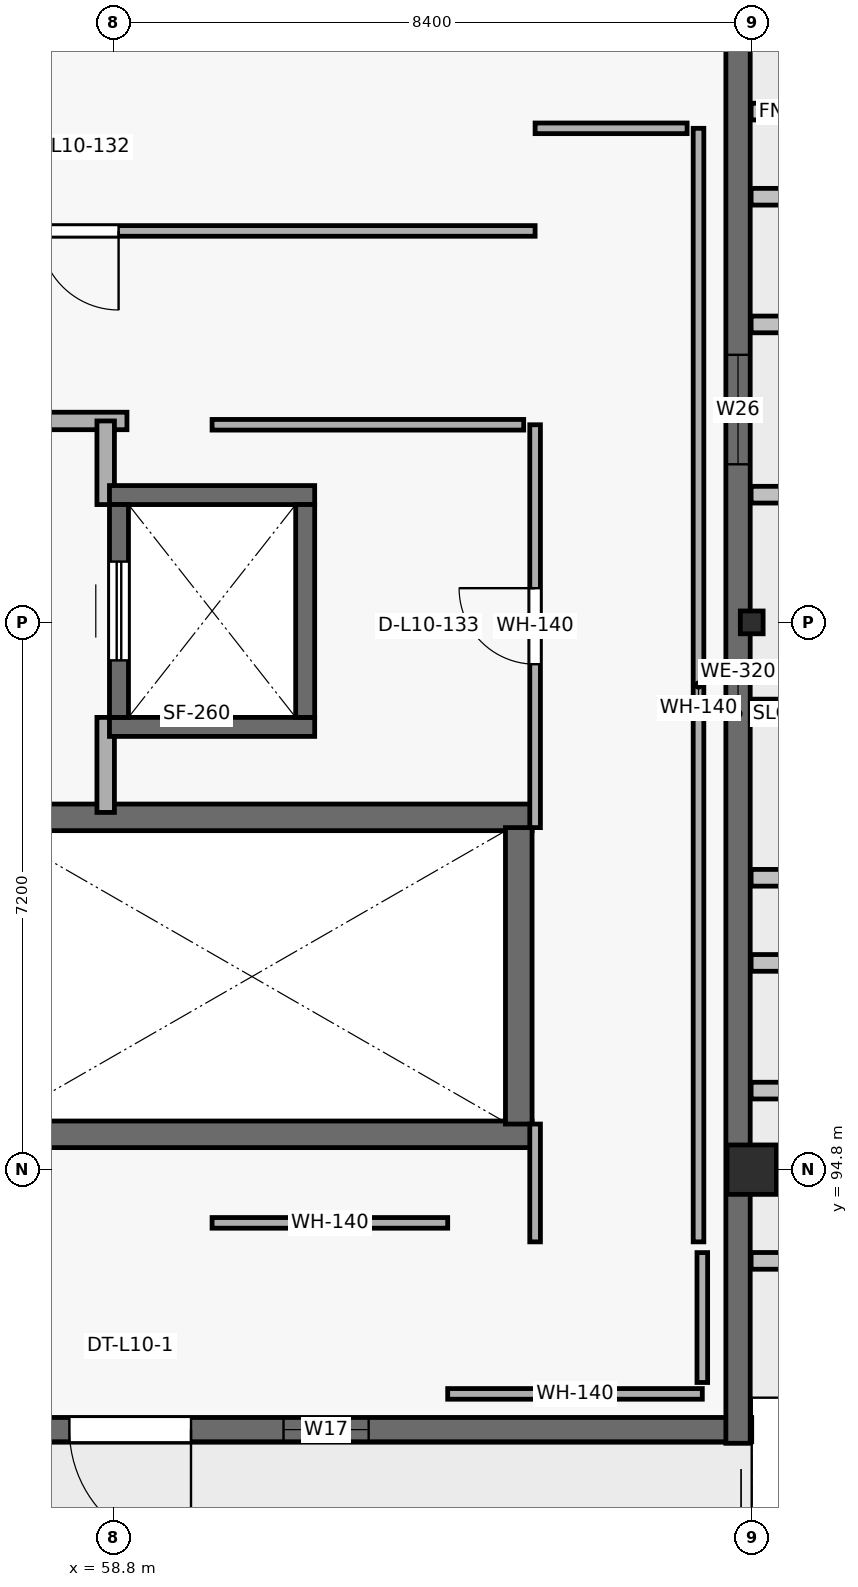
"""IFC4 building model, lengths in metres.
Left out: names, types, materials, properties, quantities, classifications, styles, units other than length and angle.
Written with IfcOpenShell. Run it as: python <this file> out.ifc"""

import sys

from ifc_helpers import new_model, si_unit, direction, frame, frame_2d, origin, origin_2d, place, context, subcontext, project, spatial, rectangle, hollow_rectangle, extrude, element, fill, save


model = new_model("IFC4")
c1 = context("Model", 3, precision=1e-05, world=origin(), true_north=direction((0.0, 1.0)))
c2 = subcontext(c1, "Body", "Model", "MODEL_VIEW")
j1 = project(units=[si_unit("LENGTHUNIT", "METRE"), si_unit("PLANEANGLEUNIT", "RADIAN")], contexts=[c1])
p1 = place(None, origin())
s1 = spatial("IfcSite", under=j1, at=p1, CompositionType="ELEMENT")
p2 = place(p1, origin())
s2 = spatial("IfcBuilding", under=s1, at=p2, CompositionType="ELEMENT")
p3 = place(p2, frame((0.0, 0.0, 44.7)))
s3 = spatial("IfcBuildingStorey", under=s2, at=p3, CompositionType="ELEMENT", Elevation=44.7)
p4 = place(p3, frame((67.2, 94.8, 0.0), z_axis=(0.0, 0.0, 1.0), x_axis=(1.0, 0.0, 0.0)))
e1 = element("IfcColumn", 1, at=p4, inside=s3, PredefinedType="COLUMN", context=c2, shape_type="SweptSolid", body=[
    extrude(rectangle(XDim=0.65, YDim=0.65, at=origin_2d()), origin(), (0.0, 0.0, 1.0), 4.8),
])
p5 = place(p3, frame((67.2, 102.0, 0.0), z_axis=(0.0, 0.0, 1.0), x_axis=(1.0, 0.0, 0.0)))
e2 = element("IfcColumn", 2, at=p5, inside=s3, PredefinedType="COLUMN", context=c2, shape_type="SweptSolid", body=[
    extrude(hollow_rectangle(XDim=0.3, YDim=0.3, WallThickness=0.012, at=origin_2d()), origin(), (0.0, 0.0, 1.0), 4.8),
])
p6 = place(p3, frame((67.2, 91.38, 0.0), z_axis=(0.0, 0.0, 1.0), x_axis=(-1.0, 0.0, 0.0)))
e3 = element("IfcWall", 3, at=p6, inside=s3, PredefinedType="SOLIDWALL", context=c2, shape_type="SweptSolid", body=[
    extrude(rectangle(XDim=33.6, YDim=0.32, at=frame_2d((16.8, 0.0))), origin(), (0.0, 0.0, 1.0), 4.58),
])
p7 = place(p6, frame((7.377, 0.0, 0.0)))
e4 = element("IfcOpeningElement", 4, at=p7, cuts=e3, PredefinedType="OPENING", context=c2, shape_type="SweptSolid", body=[
    extrude(rectangle(XDim=1.6, YDim=2.35, at=frame_2d((0.8, 1.175))), frame((0.0, 0.17, 0.0), z_axis=(0.0, -1.0, 0.0), x_axis=(1.0, 0.0, 0.0)), (0.0, 0.0, 1.0), 0.34),
])
p8 = place(p6, frame((5.04, 0.0, 0.75)))
e5 = element("IfcOpeningElement", 5, at=p8, cuts=e3, PredefinedType="OPENING", context=c2, shape_type="SweptSolid", body=[
    extrude(rectangle(XDim=1.12, YDim=2.25, at=frame_2d((0.56, 1.125))), frame((0.0, 0.17, 0.0), z_axis=(0.0, -1.0, 0.0), x_axis=(1.0, 0.0, 0.0)), (0.0, 0.0, 1.0), 0.34),
])
p9 = place(p6, frame((15.12, 0.0, 0.75)))
e6 = element("IfcOpeningElement", 6, at=p9, cuts=e3, PredefinedType="OPENING", context=c2, shape_type="SweptSolid", body=[
    extrude(rectangle(XDim=1.12, YDim=2.65, at=frame_2d((0.56, 1.325))), frame((0.0, 0.17, 0.0), z_axis=(0.0, -1.0, 0.0), x_axis=(1.0, 0.0, 0.0)), (0.0, 0.0, 1.0), 0.34),
])
p10 = place(p6, frame((25.12, 0.0, 0.75)))
e7 = element("IfcOpeningElement", 7, at=p10, cuts=e3, PredefinedType="OPENING", context=c2, shape_type="SweptSolid", body=[
    extrude(rectangle(XDim=1.28, YDim=1.85, at=frame_2d((0.64, 0.925))), frame((0.0, 0.17, 0.0), z_axis=(0.0, -1.0, 0.0), x_axis=(1.0, 0.0, 0.0)), (0.0, 0.0, 1.0), 0.34),
])
p11 = place(p3, frame((67.02, 110.4, 0.0), z_axis=(0.0, 0.0, 1.0), x_axis=(0.0, -1.0, 0.0)))
e8 = element("IfcWall", 8, at=p11, inside=s3, PredefinedType="SOLIDWALL", context=c2, shape_type="SweptSolid", body=[
    extrude(rectangle(XDim=19.2, YDim=0.32, at=frame_2d((9.6, 0.0))), origin(), (0.0, 0.0, 1.0), 4.58),
])
p12 = place(p11, frame((4.88, 0.0, 0.75)))
e9 = element("IfcOpeningElement", 9, at=p12, cuts=e8, PredefinedType="OPENING", context=c2, shape_type="SweptSolid", body=[
    extrude(rectangle(XDim=1.44, YDim=1.85, at=frame_2d((0.72, 0.925))), frame((0.0, 0.17, 0.0), z_axis=(0.0, -1.0, 0.0), x_axis=(1.0, 0.0, 0.0)), (0.0, 0.0, 1.0), 0.34),
])
p13 = place(p3, frame((55.09, 95.265, 0.0), z_axis=(0.0, 0.0, 1.0), x_axis=(1.0, 0.0, 0.0)))
e10 = element("IfcWall", 10, at=p13, inside=s3, PredefinedType="SHEAR", context=c2, shape_type="SweptSolid", body=[
    extrude(rectangle(XDim=9.22, YDim=0.35, at=frame_2d((4.61, 0.0))), origin(), (0.0, 0.0, 1.0), 4.58),
])
p14 = place(p13, frame((0.45, 0.0, 0.0)))
e11 = element("IfcOpeningElement", 11, at=p14, cuts=e10, PredefinedType="OPENING", context=c2, shape_type="SweptSolid", body=[
    extrude(rectangle(XDim=1.25, YDim=2.2, at=frame_2d((0.625, 1.1))), frame((0.0, 0.185, 0.0), z_axis=(0.0, -1.0, 0.0), x_axis=(1.0, 0.0, 0.0)), (0.0, 0.0, 1.0), 0.37),
])
p15 = place(p3, frame((64.31, 99.435, 0.0), z_axis=(0.0, 0.0, 1.0), x_axis=(-1.0, 0.0, 0.0)))
e12 = element("IfcWall", 12, at=p15, inside=s3, PredefinedType="SHEAR", context=c2, shape_type="SweptSolid", body=[
    extrude(rectangle(XDim=9.22, YDim=0.35, at=frame_2d((4.61, 0.0))), origin(), (0.0, 0.0, 1.0), 4.58),
])
p16 = place(p15, frame((7.72, 0.0, 0.0)))
e13 = element("IfcOpeningElement", 13, at=p16, cuts=e12, PredefinedType="OPENING", context=c2, shape_type="SweptSolid", body=[
    extrude(rectangle(XDim=1.2, YDim=2.2, at=frame_2d((0.6, 1.1))), frame((0.0, 0.185, 0.0), z_axis=(0.0, -1.0, 0.0), x_axis=(1.0, 0.0, 0.0)), (0.0, 0.0, 1.0), 0.37),
])
p17 = place(p3, frame((64.135, 99.3, 0.0), z_axis=(0.0, 0.0, 1.0), x_axis=(0.0, -1.0, 0.0)))
e14 = element("IfcWall", 14, at=p17, inside=s3, PredefinedType="SHEAR", context=c2, shape_type="SweptSolid", body=[
    extrude(rectangle(XDim=3.9, YDim=0.35, at=frame_2d((1.95, 0.0))), origin(), (0.0, 0.0, 1.0), 4.58),
])
p18 = place(p3, frame((55.09, 104.65, 0.0), z_axis=(0.0, 0.0, 1.0), x_axis=(1.0, 0.0, 0.0)))
e15 = element("IfcWall", 15, at=p18, inside=s3, PredefinedType="PARTITIONING", context=c2, shape_type="SweptSolid", body=[
    extrude(rectangle(XDim=3.89, YDim=0.23, at=frame_2d((1.945, 0.0))), origin(), (0.0, 0.0, 1.0), 4.58),
])
p19 = place(p18, frame((1.15, 0.0, 0.0)))
e16 = element("IfcOpeningElement", 16, at=p19, cuts=e15, PredefinedType="OPENING", context=c2, shape_type="SweptSolid", body=[
    extrude(rectangle(XDim=1.2, YDim=2.2, at=frame_2d((0.6, 1.1))), frame((0.0, 0.125, 0.0), z_axis=(0.0, -1.0, 0.0), x_axis=(1.0, 0.0, 0.0)), (0.0, 0.0, 1.0), 0.25),
])
p20 = place(p3, frame((58.7, 104.65, 0.0), z_axis=(0.0, 0.0, 1.0), x_axis=(0.0, -1.0, 0.0)))
e17 = element("IfcWall", 17, at=p20, inside=s3, PredefinedType="PARTITIONING", context=c2, shape_type="SweptSolid", body=[
    extrude(rectangle(XDim=1.1, YDim=0.23, at=frame_2d((0.55, 0.0))), origin(), (0.0, 0.0, 1.0), 4.58),
])
p21 = place(p3, frame((58.7, 100.75, 0.0), z_axis=(0.0, 0.0, 1.0), x_axis=(0.0, -1.0, 0.0)))
e18 = element("IfcWall", 18, at=p21, inside=s3, PredefinedType="PARTITIONING", context=c2, shape_type="SweptSolid", body=[
    extrude(rectangle(XDim=1.25, YDim=0.23, at=frame_2d((0.625, 0.0))), origin(), (0.0, 0.0, 1.0), 4.58),
])
for number, where, z_axis, x_axis in (
    (19, (58.75, 100.625, 0.0), (0.0, 0.0, 1.0), (1.0, 0.0, 0.0)),
    (20, (61.45, 103.675, 0.0), (0.0, 0.0, 1.0), (-1.0, 0.0, 0.0)),
):
    element("IfcWall", number, at=place(p3, frame(where, z_axis=z_axis, x_axis=x_axis)), inside=s3, PredefinedType="SHEAR", context=c2, shape_type="SweptSolid", body=[
        extrude(rectangle(XDim=2.7, YDim=0.25, at=frame_2d((1.35, 0.0))), origin(), (0.0, 0.0, 1.0), 4.58),
    ])
p22 = place(p3, frame((58.875, 100.75, 0.0), z_axis=(0.0, 0.0, 1.0), x_axis=(0.0, 1.0, 0.0)))
e21 = element("IfcWall", 21, at=p22, inside=s3, PredefinedType="SHEAR", context=c2, shape_type="SweptSolid", body=[
    extrude(rectangle(XDim=2.8, YDim=0.25, at=frame_2d((1.4, 0.0))), origin(), (0.0, 0.0, 1.0), 4.58),
])
p23 = place(p22, frame((0.75, 0.0, 0.0)))
e22 = element("IfcOpeningElement", 22, at=p23, cuts=e21, PredefinedType="OPENING", context=c2, shape_type="SweptSolid", body=[
    extrude(rectangle(XDim=1.3, YDim=2.25, at=frame_2d((0.65, 1.125))), frame((0.0, 0.135, 0.0), z_axis=(0.0, -1.0, 0.0), x_axis=(1.0, 0.0, 0.0)), (0.0, 0.0, 1.0), 0.27),
])
p24 = place(p3, frame((61.325, 103.55, 0.0), z_axis=(0.0, 0.0, 1.0), x_axis=(0.0, -1.0, 0.0)))
e23 = element("IfcWall", 23, at=p24, inside=s3, PredefinedType="SHEAR", context=c2, shape_type="SweptSolid", body=[
    extrude(rectangle(XDim=2.8, YDim=0.25, at=frame_2d((1.4, 0.0))), origin(), (0.0, 0.0, 1.0), 4.58),
])
p25 = place(p3, frame((66.5, 93.85, 0.0), z_axis=(0.0, 0.0, 1.0), x_axis=(0.0, 1.0, 0.0)))
e24 = element("IfcWall", 24, at=p25, inside=s3, PredefinedType="PARTITIONING", context=c2, shape_type="SweptSolid", body=[
    extrude(rectangle(XDim=14.65, YDim=0.14, at=frame_2d((7.325, 0.0))), origin(), (0.0, 0.0, 1.0), 4.58),
])
p26 = place(p3, frame((64.35, 107.15, 0.0), z_axis=(0.0, 0.0, 1.0), x_axis=(-1.0, 0.0, 0.0)))
e25 = element("IfcWall", 25, at=p26, inside=s3, PredefinedType="PARTITIONING", context=c2, shape_type="SweptSolid", body=[
    extrude(rectangle(XDim=12.0, YDim=0.14, at=frame_2d((6.0, 0.0))), origin(), (0.0, 0.0, 1.0), 4.58),
])
p27 = place(p26, frame((5.48, 0.0, 0.0)))
e26 = element("IfcOpeningElement", 26, at=p27, cuts=e25, PredefinedType="OPENING", context=c2, shape_type="SweptSolid", body=[
    extrude(rectangle(XDim=1.04, YDim=2.26, at=frame_2d((0.52, 1.13))), frame((0.0, 0.08, 0.0), z_axis=(0.0, -1.0, 0.0), x_axis=(1.0, 0.0, 0.0)), (0.0, 0.0, 1.0), 0.16),
])
p28 = place(p3, frame((64.35, 104.6, 0.0), z_axis=(0.0, 0.0, 1.0), x_axis=(0.0, -1.0, 0.0)))
e27 = element("IfcWall", 27, at=p28, inside=s3, PredefinedType="PARTITIONING", context=c2, shape_type="SweptSolid", body=[
    extrude(rectangle(XDim=5.3, YDim=0.14, at=frame_2d((2.65, 0.0))), origin(), (0.0, 0.0, 1.0), 4.58),
])
p29 = place(p28, frame((2.15, 0.0, 0.0)))
e28 = element("IfcOpeningElement", 28, at=p29, cuts=e27, PredefinedType="OPENING", context=c2, shape_type="SweptSolid", body=[
    extrude(rectangle(XDim=1.0, YDim=2.22, at=frame_2d((0.5, 1.11))), frame((0.0, 0.08, 0.0), z_axis=(0.0, -1.0, 0.0), x_axis=(1.0, 0.0, 0.0)), (0.0, 0.0, 1.0), 0.16),
])
p30 = place(p3, frame((64.35, 95.4, 0.0), z_axis=(0.0, 0.0, 1.0), x_axis=(0.0, -1.0, 0.0)))
e29 = element("IfcWall", 29, at=p30, inside=s3, PredefinedType="PARTITIONING", context=c2, shape_type="SweptSolid", body=[
    extrude(rectangle(XDim=1.55, YDim=0.14, at=frame_2d((0.775, 0.0))), origin(), (0.0, 0.0, 1.0), 4.58),
])
p31 = place(p3, frame((60.1, 104.6, 0.0), z_axis=(0.0, 0.0, 1.0), x_axis=(1.0, 0.0, 0.0)))
e30 = element("IfcWall", 30, at=p31, inside=s3, PredefinedType="PARTITIONING", context=c2, shape_type="SweptSolid", body=[
    extrude(rectangle(XDim=4.1, YDim=0.14, at=frame_2d((2.05, 0.0))), origin(), (0.0, 0.0, 1.0), 4.58),
])
p32 = place(p3, frame((63.2, 91.85, 0.0), z_axis=(0.0, 0.0, 1.0), x_axis=(1.0, 0.0, 0.0)))
e31 = element("IfcWall", 31, at=p32, inside=s3, PredefinedType="PARTITIONING", context=c2, shape_type="SweptSolid", body=[
    extrude(rectangle(XDim=3.35, YDim=0.14, at=frame_2d((1.675, 0.0))), origin(), (0.0, 0.0, 1.0), 4.58),
])
p33 = place(p3, frame((63.2, 94.1, 0.0), z_axis=(0.0, 0.0, 1.0), x_axis=(-1.0, 0.0, 0.0)))
e32 = element("IfcWall", 32, at=p33, inside=s3, PredefinedType="PARTITIONING", context=c2, shape_type="SweptSolid", body=[
    extrude(rectangle(XDim=3.1, YDim=0.14, at=frame_2d((1.55, 0.0))), origin(), (0.0, 0.0, 1.0), 4.58),
])
p34 = place(p3, frame((66.35, 108.5, 0.0), z_axis=(0.0, 0.0, 1.0), x_axis=(-1.0, 0.0, 0.0)))
e33 = element("IfcWall", 33, at=p34, inside=s3, PredefinedType="PARTITIONING", context=c2, shape_type="SweptSolid", body=[
    extrude(rectangle(XDim=2.0, YDim=0.14, at=frame_2d((1.0, 0.0))), origin(), (0.0, 0.0, 1.0), 4.58),
])
p35 = place(p3, frame((66.55, 92.0, 0.0), z_axis=(0.0, 0.0, 1.0), x_axis=(0.0, 1.0, 0.0)))
e34 = element("IfcWall", 34, at=p35, inside=s3, PredefinedType="PARTITIONING", context=c2, shape_type="SweptSolid", body=[
    extrude(rectangle(XDim=1.709, YDim=0.14, at=frame_2d((0.854, 0.0))), origin(), (0.0, 0.0, 1.0), 4.58),
])
p36 = place(p7, origin())
e35 = element("IfcDoor", 35, at=p36, inside=s3, OperationType="SINGLE_SWING_LEFT", PredefinedType="DOOR", context=c2, shape_type="SweptSolid", body=[
    extrude(rectangle(XDim=1.6, YDim=2.35, at=frame_2d((0.8, 1.175))), frame((0.0, 0.025, 0.0), z_axis=(0.0, -1.0, 0.0), x_axis=(1.0, 0.0, 0.0)), (0.0, 0.0, 1.0), 0.05),
])
fill(e4, e35)
p37 = place(p8, origin())
e36 = element("IfcWindow", 36, at=p37, inside=s3, PartitioningType="SINGLE_PANEL", PredefinedType="WINDOW", context=c2, shape_type="SweptSolid", body=[
    extrude(rectangle(XDim=1.12, YDim=2.25, at=frame_2d((0.56, 1.125))), frame((0.0, 0.03, 0.0), z_axis=(0.0, -1.0, 0.0), x_axis=(1.0, 0.0, 0.0)), (0.0, 0.0, 1.0), 0.06),
])
fill(e5, e36)
p38 = place(p12, origin())
e37 = element("IfcWindow", 37, at=p38, inside=s3, PartitioningType="SINGLE_PANEL", PredefinedType="WINDOW", context=c2, shape_type="SweptSolid", body=[
    extrude(rectangle(XDim=1.44, YDim=1.85, at=frame_2d((0.72, 0.925))), frame((0.0, 0.03, 0.0), z_axis=(0.0, -1.0, 0.0), x_axis=(1.0, 0.0, 0.0)), (0.0, 0.0, 1.0), 0.06),
])
fill(e9, e37)
p39 = place(p23, origin())
e38 = element("IfcDoor", 38, at=p39, inside=s3, OperationType="SLIDING_TO_LEFT", PredefinedType="DOOR", context=c2, shape_type="SweptSolid", body=[
    extrude(rectangle(XDim=1.3, YDim=2.25, at=frame_2d((0.65, 1.125))), frame((0.0, 0.025, 0.0), z_axis=(0.0, -1.0, 0.0), x_axis=(1.0, 0.0, 0.0)), (0.0, 0.0, 1.0), 0.05),
])
fill(e22, e38)
p40 = place(p27, origin())
e39 = element("IfcDoor", 39, at=p40, inside=s3, OperationType="SINGLE_SWING_LEFT", PredefinedType="DOOR", context=c2, shape_type="SweptSolid", body=[
    extrude(rectangle(XDim=1.04, YDim=2.26, at=frame_2d((0.52, 1.13))), frame((0.0, 0.025, 0.0), z_axis=(0.0, -1.0, 0.0), x_axis=(1.0, 0.0, 0.0)), (0.0, 0.0, 1.0), 0.05),
])
fill(e26, e39)
p41 = place(p29, origin())
e40 = element("IfcDoor", 40, at=p41, inside=s3, OperationType="SINGLE_SWING_RIGHT", PredefinedType="DOOR", context=c2, shape_type="SweptSolid", body=[
    extrude(rectangle(XDim=1.0, YDim=2.22, at=frame_2d((0.5, 1.11))), frame((0.0, 0.025, 0.0), z_axis=(0.0, -1.0, 0.0), x_axis=(1.0, 0.0, 0.0)), (0.0, 0.0, 1.0), 0.05),
])
fill(e28, e40)
save(model, sys.argv[1])
